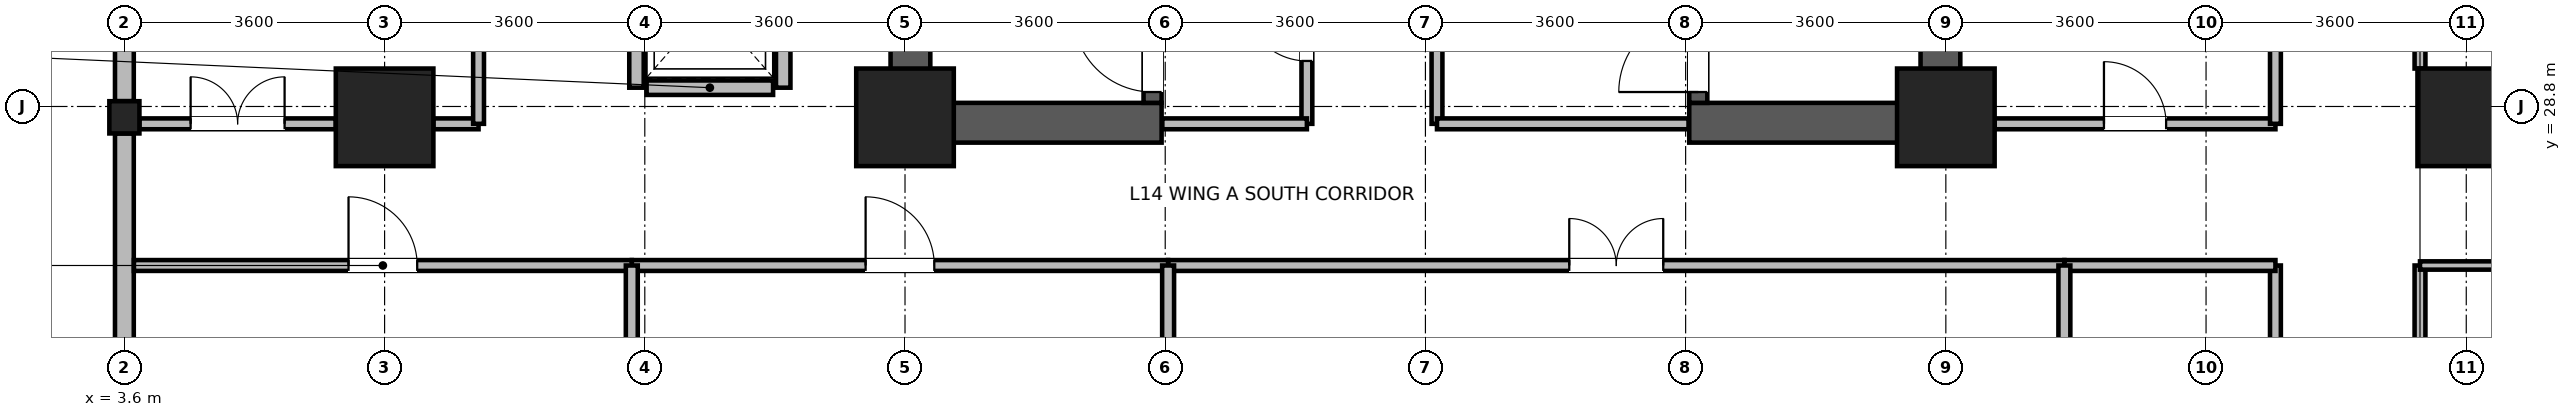
"""IFC4 building model, lengths in metres.
Left out: names, types, materials, properties, quantities, classifications, styles, units other than length and angle.
Written with IfcOpenShell. Run it as: python <this file> out.ifc"""

import sys

from ifc_helpers import new_model, si_unit, direction, frame, frame_2d, origin, origin_2d, place, context, subcontext, project, spatial, rectangle, i_section, extrude, source, transform, mapped, element, fill, save


model = new_model("IFC4")
c1 = context("Model", 3, precision=1e-05, world=origin(), true_north=direction((0.0, 1.0)))
c2 = subcontext(c1, "Body", "Model", "MODEL_VIEW")
j1 = project(units=[si_unit("LENGTHUNIT", "METRE"), si_unit("PLANEANGLEUNIT", "RADIAN")], contexts=[c1])
p1 = place(None, origin())
s1 = spatial("IfcSite", under=j1, at=p1, CompositionType="ELEMENT")
p2 = place(p1, origin())
s2 = spatial("IfcBuilding", under=s1, at=p2, CompositionType="ELEMENT")
p3 = place(p2, frame((0.0, 0.0, 58.6)))
s3 = spatial("IfcBuildingStorey", under=s2, at=p3, CompositionType="ELEMENT", Elevation=58.6)
for number, where, z_axis, x_axis in (
    (1, (14.475, 28.3, 0.0), (0.0, 0.0, 1.0), (0.0, 1.0, 0.0)),
    (2, (28.725, 28.3, 0.0), (0.0, 0.0, 1.0), (0.0, 1.0, 0.0)),
):
    element("IfcWall", number, at=place(p3, frame(where, z_axis=z_axis, x_axis=x_axis)), inside=s3, PredefinedType="SHEAR", context=c2, shape_type="SweptSolid", body=[
        extrude(rectangle(XDim=8.1, YDim=0.55, at=frame_2d((4.05, 0.0))), origin(), (0.0, 0.0, 1.0), 3.45),
    ])
for number, where, z_axis, x_axis in (
    (3, (14.75, 28.575, 0.0), (0.0, 0.0, 1.0), (1.0, 0.0, 0.0)),
    (4, (25.25, 28.575, 0.0), (0.0, 0.0, 1.0), (1.0, 0.0, 0.0)),
):
    element("IfcWall", number, at=place(p3, frame(where, z_axis=z_axis, x_axis=x_axis)), inside=s3, PredefinedType="SHEAR", context=c2, shape_type="SweptSolid", body=[
        extrude(rectangle(XDim=3.2, YDim=0.55, at=frame_2d((1.6, 0.0))), origin(), (0.0, 0.0, 1.0), 3.45),
    ])
p4 = place(p3, frame((17.825, 28.85, 0.0), z_axis=(0.0, 0.0, 1.0), x_axis=(0.0, 1.0, 0.0)))
e5 = element("IfcWall", 5, at=p4, inside=s3, PredefinedType="SHEAR", context=c2, shape_type="SweptSolid", body=[
    extrude(rectangle(XDim=7.0, YDim=0.25, at=frame_2d((3.5, 0.0))), origin(), (0.0, 0.0, 1.0), 3.45),
])
p5 = place(p4, frame((0.15, 0.0, 0.0)))
e6 = element("IfcOpeningElement", 6, at=p5, cuts=e5, PredefinedType="OPENING", context=c2, shape_type="SweptSolid", body=[
    extrude(rectangle(XDim=1.1, YDim=2.08, at=frame_2d((0.55, 1.04))), frame((0.0, 0.135, 0.0), z_axis=(0.0, -1.0, 0.0), x_axis=(1.0, 0.0, 0.0)), (0.0, 0.0, 1.0), 0.27),
])
p6 = place(p3, frame((25.375, 28.85, 0.0), z_axis=(0.0, 0.0, 1.0), x_axis=(0.0, 1.0, 0.0)))
e7 = element("IfcWall", 7, at=p6, inside=s3, PredefinedType="SHEAR", context=c2, shape_type="SweptSolid", body=[
    extrude(rectangle(XDim=7.0, YDim=0.25, at=frame_2d((3.5, 0.0))), origin(), (0.0, 0.0, 1.0), 3.45),
])
p7 = place(p6, frame((0.15, 0.0, 0.0)))
e8 = element("IfcOpeningElement", 8, at=p7, cuts=e7, PredefinedType="OPENING", context=c2, shape_type="SweptSolid", body=[
    extrude(rectangle(XDim=1.1, YDim=2.08, at=frame_2d((0.55, 1.04))), frame((0.0, 0.135, 0.0), z_axis=(0.0, -1.0, 0.0), x_axis=(1.0, 0.0, 0.0)), (0.0, 0.0, 1.0), 0.27),
])
m1 = source(origin(), c2, "Body", "SweptSolid", [
    extrude(rectangle(XDim=1.35, YDim=1.35, at=origin_2d()), origin(), (0.0, 0.0, 1.0), 3.7),
])
for number, where, z_axis, x_axis in (
    (9, (7.2, 28.65, 0.0), (0.0, 0.0, 1.0), (1.0, 0.0, 0.0)),
    (10, (14.4, 28.65, 0.0), (0.0, 0.0, 1.0), (1.0, 0.0, 0.0)),
    (11, (28.8, 28.65, 0.0), (0.0, 0.0, 1.0), (1.0, 0.0, 0.0)),
    (12, (36.0, 28.65, 0.0), (0.0, 0.0, 1.0), (1.0, 0.0, 0.0)),
):
    element("IfcColumn", number, at=place(p3, frame(where, z_axis=z_axis, x_axis=x_axis)), inside=s3, PredefinedType="COLUMN", context=c2, shape_type="MappedRepresentation", body=[
        mapped(m1, transform((0.0, 0.0, 0.0), x_axis=(1.0, 0.0, 0.0), y_axis=(0.0, 1.0, 0.0), z_axis=(0.0, 0.0, 1.0), scale=1.0)),
    ])
m2 = source(origin(), c2, "Body", "SweptSolid", [
    extrude(i_section(OverallWidth=0.416, OverallDepth=0.446, WebThickness=0.029, FlangeThickness=0.04, FilletRadius=0.015, at=origin_2d()), origin(), (0.0, 0.0, 1.0), 3.7),
])
p8 = place(p3, frame((3.6, 28.65, 0.0), z_axis=(0.0, 0.0, 1.0), x_axis=(1.0, 0.0, 0.0)))
e13 = element("IfcColumn", 13, at=p8, inside=s3, PredefinedType="COLUMN", context=c2, shape_type="MappedRepresentation", body=[
    mapped(m2, transform((0.0, 0.0, 0.0), x_axis=(1.0, 0.0, 0.0), y_axis=(0.0, 1.0, 0.0), z_axis=(0.0, 0.0, 1.0), scale=1.0)),
])
p9 = place(p3, frame((3.6, 28.874, 0.0), z_axis=(0.0, 0.0, 1.0), x_axis=(0.0, 1.0, 0.0)))
e14 = element("IfcWall", 14, at=p9, inside=s3, PredefinedType="STANDARD", context=c2, shape_type="SweptSolid", body=[
    extrude(rectangle(XDim=7.052, YDim=0.26, at=frame_2d((3.526, 0.0))), origin(), (0.0, 0.0, 1.0), 2.93),
])
p10 = place(p9, frame((1.013, 0.0, 0.85)))
e15 = element("IfcOpeningElement", 15, at=p10, cuts=e14, PredefinedType="OPENING", context=c2, shape_type="SweptSolid", body=[
    extrude(rectangle(XDim=1.5, YDim=1.85, at=frame_2d((0.75, 0.925))), frame((0.0, 0.14, 0.0), z_axis=(0.0, -1.0, 0.0), x_axis=(1.0, 0.0, 0.0)), (0.0, 0.0, 1.0), 0.28),
])
p11 = place(p9, frame((4.539, 0.0, 0.85)))
e16 = element("IfcOpeningElement", 16, at=p11, cuts=e14, PredefinedType="OPENING", context=c2, shape_type="SweptSolid", body=[
    extrude(rectangle(XDim=1.5, YDim=1.85, at=frame_2d((0.75, 0.925))), frame((0.0, 0.14, 0.0), z_axis=(0.0, -1.0, 0.0), x_axis=(1.0, 0.0, 0.0)), (0.0, 0.0, 1.0), 0.28),
])
p12 = place(p3, frame((3.6, 21.47, 0.0), z_axis=(0.0, 0.0, 1.0), x_axis=(0.0, 1.0, 0.0)))
e17 = element("IfcWall", 17, at=p12, inside=s3, PredefinedType="STANDARD", context=c2, shape_type="SweptSolid", body=[
    extrude(rectangle(XDim=6.956, YDim=0.26, at=frame_2d((3.478, 0.0))), origin(), (0.0, 0.0, 1.0), 3.43),
])
p13 = place(p12, frame((0.989, 0.0, 0.85)))
e18 = element("IfcOpeningElement", 18, at=p13, cuts=e17, PredefinedType="OPENING", context=c2, shape_type="SweptSolid", body=[
    extrude(rectangle(XDim=1.5, YDim=1.85, at=frame_2d((0.75, 0.925))), frame((0.0, 0.14, 0.0), z_axis=(0.0, -1.0, 0.0), x_axis=(1.0, 0.0, 0.0)), (0.0, 0.0, 1.0), 0.28),
])
p14 = place(p12, frame((3.003, 0.0, 0.85)))
e19 = element("IfcOpeningElement", 19, at=p14, cuts=e17, PredefinedType="OPENING", context=c2, shape_type="SweptSolid", body=[
    extrude(rectangle(XDim=0.95, YDim=1.75, at=frame_2d((0.475, 0.875))), frame((0.0, 0.14, 0.0), z_axis=(0.0, -1.0, 0.0), x_axis=(1.0, 0.0, 0.0)), (0.0, 0.0, 1.0), 0.28),
])
p15 = place(p3, frame((10.825, 29.06, 0.0), z_axis=(0.0, 0.0, 1.0), x_axis=(1.0, 0.0, 0.0)))
e20 = element("IfcWall", 20, at=p15, inside=s3, PredefinedType="PARTITIONING", context=c2, shape_type="SweptSolid", body=[
    extrude(rectangle(XDim=1.75, YDim=0.2, at=frame_2d((0.875, 0.0))), origin(), (0.0, 0.0, 1.0), 3.43),
])
for number, where, z_axis, x_axis in (
    (21, (10.685, 29.06, 0.0), (0.0, 0.0, 1.0), (0.0, 1.0, 0.0)),
    (22, (12.715, 29.06, 0.0), (0.0, 0.0, 1.0), (0.0, 1.0, 0.0)),
):
    element("IfcWall", number, at=place(p3, frame(where, z_axis=z_axis, x_axis=x_axis)), inside=s3, PredefinedType="PARTITIONING", context=c2, shape_type="SweptSolid", body=[
        extrude(rectangle(XDim=2.28, YDim=0.2, at=frame_2d((1.14, 0.0))), origin(), (0.0, 0.0, 1.0), 3.43),
    ])
p16 = place(p3, frame((18.04, 26.6, 0.0), z_axis=(0.0, 0.0, 1.0), x_axis=(1.0, 0.0, 0.0)))
e23 = element("IfcWall", 23, at=p16, inside=s3, PredefinedType="PARTITIONING", context=c2, shape_type="SweptSolid", body=[
    extrude(rectangle(XDim=12.4, YDim=0.15, at=frame_2d((6.2, 0.0))), origin(), (0.0, 0.0, 1.0), 3.43),
])
p17 = place(p16, frame((5.55, 0.0, 0.0)))
e24 = element("IfcOpeningElement", 24, at=p17, cuts=e23, PredefinedType="OPENING", context=c2, shape_type="SweptSolid", body=[
    extrude(rectangle(XDim=1.3, YDim=2.12, at=frame_2d((0.65, 1.06))), frame((0.0, 0.085, 0.0), z_axis=(0.0, -1.0, 0.0), x_axis=(1.0, 0.0, 0.0)), (0.0, 0.0, 1.0), 0.17),
])
p18 = place(p3, frame((35.36, 22.275, 0.0), z_axis=(0.0, 0.0, 1.0), x_axis=(0.0, 1.0, 0.0)))
e25 = element("IfcWall", 25, at=p18, inside=s3, PredefinedType="PARTITIONING", context=c2, shape_type="SweptSolid", body=[
    extrude(rectangle(XDim=4.325, YDim=0.15, at=frame_2d((2.163, 0.0))), origin(), (0.0, 0.0, 1.0), 3.43),
])
p19 = place(p3, frame((35.36, 29.325, 0.0), z_axis=(0.0, 0.0, 1.0), x_axis=(0.0, 1.0, 0.0)))
e26 = element("IfcWall", 26, at=p19, inside=s3, PredefinedType="PARTITIONING", context=c2, shape_type="SweptSolid", body=[
    extrude(rectangle(XDim=6.15, YDim=0.15, at=frame_2d((3.075, 0.0))), origin(), (0.0, 0.0, 1.0), 3.43),
])
p20 = place(p19, frame((2.425, 0.0, 0.0)))
e27 = element("IfcOpeningElement", 27, at=p20, cuts=e26, PredefinedType="OPENING", context=c2, shape_type="SweptSolid", body=[
    extrude(rectangle(XDim=1.3, YDim=2.12, at=frame_2d((0.65, 1.06))), frame((0.0, 0.085, 0.0), z_axis=(0.0, -1.0, 0.0), x_axis=(1.0, 0.0, 0.0)), (0.0, 0.0, 1.0), 0.17),
])
p21 = place(p3, frame((10.62, 26.6, 0.0), z_axis=(0.0, 0.0, 1.0), x_axis=(1.0, 0.0, 0.0)))
e28 = element("IfcWall", 28, at=p21, inside=s3, PredefinedType="PARTITIONING", context=c2, shape_type="SweptSolid", body=[
    extrude(rectangle(XDim=7.42, YDim=0.15, at=frame_2d((3.71, 0.0))), origin(), (0.0, 0.0, 1.0), 3.43),
])
p22 = place(p21, frame((3.235, 0.0, 0.0)))
e29 = element("IfcOpeningElement", 29, at=p22, cuts=e28, PredefinedType="OPENING", context=c2, shape_type="SweptSolid", body=[
    extrude(rectangle(XDim=0.95, YDim=2.1, at=frame_2d((0.475, 1.05))), frame((0.0, 0.085, 0.0), z_axis=(0.0, -1.0, 0.0), x_axis=(1.0, 0.0, 0.0)), (0.0, 0.0, 1.0), 0.17),
])
p23 = place(p3, frame((3.732, 26.6, 0.0), z_axis=(0.0, 0.0, 1.0), x_axis=(1.0, 0.0, 0.0)))
e30 = element("IfcWall", 30, at=p23, inside=s3, PredefinedType="PARTITIONING", context=c2, shape_type="SweptSolid", body=[
    extrude(rectangle(XDim=6.888, YDim=0.15, at=frame_2d((3.444, 0.0))), origin(), (0.0, 0.0, 1.0), 3.43),
])
p24 = place(p23, frame((2.969, 0.0, 0.0)))
e31 = element("IfcOpeningElement", 31, at=p24, cuts=e30, PredefinedType="OPENING", context=c2, shape_type="SweptSolid", body=[
    extrude(rectangle(XDim=0.95, YDim=2.1, at=frame_2d((0.475, 1.05))), frame((0.0, 0.085, 0.0), z_axis=(0.0, -1.0, 0.0), x_axis=(1.0, 0.0, 0.0)), (0.0, 0.0, 1.0), 0.17),
])
p25 = place(p3, frame((33.36, 21.6, 0.0), z_axis=(0.0, 0.0, 1.0), x_axis=(0.0, 1.0, 0.0)))
e32 = element("IfcWall", 32, at=p25, inside=s3, PredefinedType="PARTITIONING", context=c2, shape_type="SweptSolid", body=[
    extrude(rectangle(XDim=5.0, YDim=0.15, at=frame_2d((2.5, 0.0))), origin(), (0.0, 0.0, 1.0), 3.43),
])
p26 = place(p25, frame((2.07, 0.0, 0.0)))
e33 = element("IfcOpeningElement", 33, at=p26, cuts=e32, PredefinedType="OPENING", context=c2, shape_type="SweptSolid", body=[
    extrude(rectangle(XDim=0.86, YDim=2.02, at=frame_2d((0.43, 1.01))), frame((0.0, 0.085, 0.0), z_axis=(0.0, -1.0, 0.0), x_axis=(1.0, 0.0, 0.0)), (0.0, 0.0, 1.0), 0.17),
])
p27 = place(p3, frame((3.808, 28.56, 0.0), z_axis=(0.0, 0.0, 1.0), x_axis=(1.0, 0.0, 0.0)))
e34 = element("IfcWall", 34, at=p27, inside=s3, PredefinedType="PARTITIONING", context=c2, shape_type="SweptSolid", body=[
    extrude(rectangle(XDim=2.717, YDim=0.15, at=frame_2d((1.358, 0.0))), origin(), (0.0, 0.0, 1.0), 2.78),
])
p28 = place(p27, frame((0.708, 0.0, 0.0)))
e35 = element("IfcOpeningElement", 35, at=p28, cuts=e34, PredefinedType="OPENING", context=c2, shape_type="SweptSolid", body=[
    extrude(rectangle(XDim=1.3, YDim=2.12, at=frame_2d((0.65, 1.06))), frame((0.0, 0.085, 0.0), z_axis=(0.0, -1.0, 0.0), x_axis=(1.0, 0.0, 0.0)), (0.0, 0.0, 1.0), 0.17),
])
p29 = place(p3, frame((7.875, 28.56, 0.0), z_axis=(0.0, 0.0, 1.0), x_axis=(1.0, 0.0, 0.0)))
e36 = element("IfcWall", 36, at=p29, inside=s3, PredefinedType="PARTITIONING", context=c2, shape_type="SweptSolid", body=[
    extrude(rectangle(XDim=0.625, YDim=0.15, at=frame_2d((0.312, 0.0))), origin(), (0.0, 0.0, 1.0), 2.78),
])
p30 = place(p3, frame((29.475, 28.56, 0.0), z_axis=(0.0, 0.0, 1.0), x_axis=(1.0, 0.0, 0.0)))
e37 = element("IfcWall", 37, at=p30, inside=s3, PredefinedType="PARTITIONING", context=c2, shape_type="SweptSolid", body=[
    extrude(rectangle(XDim=3.885, YDim=0.15, at=frame_2d((1.942, 0.0))), origin(), (0.0, 0.0, 1.0), 2.78),
])
p31 = place(p30, frame((1.512, 0.0, 0.0)))
e38 = element("IfcOpeningElement", 38, at=p31, cuts=e37, PredefinedType="OPENING", context=c2, shape_type="SweptSolid", body=[
    extrude(rectangle(XDim=0.86, YDim=2.02, at=frame_2d((0.43, 1.01))), frame((0.0, 0.085, 0.0), z_axis=(0.0, -1.0, 0.0), x_axis=(1.0, 0.0, 0.0)), (0.0, 0.0, 1.0), 0.17),
])
for number, where, z_axis, x_axis in (
    (39, (8.5, 28.56, 0.0), (0.0, 0.0, 1.0), (0.0, 1.0, 0.0)),
    (40, (33.36, 28.56, 0.0), (0.0, 0.0, 1.0), (0.0, 1.0, 0.0)),
):
    element("IfcWall", number, at=place(p3, frame(where, z_axis=z_axis, x_axis=x_axis)), inside=s3, PredefinedType="PARTITIONING", context=c2, shape_type="SweptSolid", body=[
        extrude(rectangle(XDim=3.84, YDim=0.15, at=frame_2d((1.92, 0.0))), origin(), (0.0, 0.0, 1.0), 3.43),
    ])
p32 = place(p3, frame((30.44, 26.6, 0.0), z_axis=(0.0, 0.0, 1.0), x_axis=(1.0, 0.0, 0.0)))
e41 = element("IfcWall", 41, at=p32, inside=s3, PredefinedType="PARTITIONING", context=c2, shape_type="SweptSolid", body=[
    extrude(rectangle(XDim=2.92, YDim=0.15, at=frame_2d((1.46, 0.0))), origin(), (0.0, 0.0, 1.0), 3.43),
])
p33 = place(p3, frame((19.96, 28.56, 0.0), z_axis=(0.0, 0.0, 1.0), x_axis=(0.0, 1.0, 0.0)))
e42 = element("IfcWall", 42, at=p33, inside=s3, PredefinedType="PARTITIONING", context=c2, shape_type="SweptSolid", body=[
    extrude(rectangle(XDim=2.6, YDim=0.15, at=frame_2d((1.3, 0.0))), origin(), (0.0, 0.0, 1.0), 3.43),
])
p34 = place(p33, frame((0.87, 0.0, 0.0)))
e43 = element("IfcOpeningElement", 43, at=p34, cuts=e42, PredefinedType="OPENING", context=c2, shape_type="SweptSolid", body=[
    extrude(rectangle(XDim=0.86, YDim=2.02, at=frame_2d((0.43, 1.01))), frame((0.0, 0.085, 0.0), z_axis=(0.0, -1.0, 0.0), x_axis=(1.0, 0.0, 0.0)), (0.0, 0.0, 1.0), 0.17),
])
p35 = place(p3, frame((17.96, 28.56, 0.0), z_axis=(0.0, 0.0, 1.0), x_axis=(1.0, 0.0, 0.0)))
e44 = element("IfcWall", 44, at=p35, inside=s3, PredefinedType="PARTITIONING", context=c2, shape_type="SweptSolid", body=[
    extrude(rectangle(XDim=2.0, YDim=0.15, at=frame_2d((1.0, 0.0))), origin(), (0.0, 0.0, 1.0), 2.23),
])
p36 = place(p3, frame((35.36, 26.6, 0.0), z_axis=(0.0, 0.0, 1.0), x_axis=(1.0, 0.0, 0.0)))
e45 = element("IfcWall", 45, at=p36, inside=s3, PredefinedType="PARTITIONING", context=c2, shape_type="SweptSolid", body=[
    extrude(rectangle(XDim=7.42, YDim=0.115, at=frame_2d((3.71, 0.0))), origin(), (0.0, 0.0, 1.0), 3.43),
])
p37 = place(p3, frame((18.04, 21.732, 0.0), z_axis=(0.0, 0.0, 1.0), x_axis=(0.0, 1.0, 0.0)))
e46 = element("IfcWall", 46, at=p37, inside=s3, PredefinedType="PARTITIONING", context=c2, shape_type="SweptSolid", body=[
    extrude(rectangle(XDim=4.868, YDim=0.165, at=frame_2d((2.434, 0.0))), origin(), (0.0, 0.0, 1.0), 3.07),
])
p38 = place(p3, frame((30.44, 21.6, 0.0), z_axis=(0.0, 0.0, 1.0), x_axis=(0.0, 1.0, 0.0)))
e47 = element("IfcWall", 47, at=p38, inside=s3, PredefinedType="PARTITIONING", context=c2, shape_type="SweptSolid", body=[
    extrude(rectangle(XDim=5.0, YDim=0.165, at=frame_2d((2.5, 0.0))), origin(), (0.0, 0.0, 1.0), 3.43),
])
p39 = place(p3, frame((21.76, 28.56, 0.0), z_axis=(0.0, 0.0, 1.0), x_axis=(0.0, 1.0, 0.0)))
e48 = element("IfcWall", 48, at=p39, inside=s3, PredefinedType="PARTITIONING", context=c2, shape_type="SweptSolid", body=[
    extrude(rectangle(XDim=4.6, YDim=0.15, at=frame_2d((2.3, 0.0))), origin(), (0.0, 0.0, 1.0), 3.43),
])
p40 = place(p39, frame((1.55, 0.0, 0.0)))
e49 = element("IfcOpeningElement", 49, at=p40, cuts=e48, PredefinedType="OPENING", context=c2, shape_type="SweptSolid", body=[
    extrude(rectangle(XDim=1.5, YDim=2.1, at=frame_2d((0.75, 1.05))), frame((0.0, 0.085, 0.0), z_axis=(0.0, -1.0, 0.0), x_axis=(1.0, 0.0, 0.0)), (0.0, 0.0, 1.0), 0.17),
])
p41 = place(p3, frame((21.76, 28.56, 0.0), z_axis=(0.0, 0.0, 1.0), x_axis=(1.0, 0.0, 0.0)))
e50 = element("IfcWall", 50, at=p41, inside=s3, PredefinedType="PARTITIONING", context=c2, shape_type="SweptSolid", body=[
    extrude(rectangle(XDim=3.48, YDim=0.15, at=frame_2d((1.74, 0.0))), origin(), (0.0, 0.0, 1.0), 2.23),
])
p42 = place(p3, frame((10.62, 23.5, 0.0), z_axis=(0.0, 0.0, 1.0), x_axis=(0.0, 1.0, 0.0)))
e51 = element("IfcWall", 51, at=p42, inside=s3, PredefinedType="PARTITIONING", context=c2, shape_type="SweptSolid", body=[
    extrude(rectangle(XDim=3.1, YDim=0.165, at=frame_2d((1.55, 0.0))), origin(), (0.0, 0.0, 1.0), 3.43),
])
p43 = place(p5, origin())
e52 = element("IfcDoor", 52, at=p43, inside=s3, OperationType="SINGLE_SWING_RIGHT", PredefinedType="DOOR", context=c2, shape_type="SweptSolid", body=[
    extrude(rectangle(XDim=1.1, YDim=2.08, at=frame_2d((0.55, 1.04))), frame((0.0, 0.025, 0.0), z_axis=(0.0, -1.0, 0.0), x_axis=(1.0, 0.0, 0.0)), (0.0, 0.0, 1.0), 0.05),
])
fill(e6, e52)
p44 = place(p7, origin())
e53 = element("IfcDoor", 53, at=p44, inside=s3, OperationType="SINGLE_SWING_LEFT", PredefinedType="DOOR", context=c2, shape_type="SweptSolid", body=[
    extrude(rectangle(XDim=1.1, YDim=2.08, at=frame_2d((0.55, 1.04))), frame((0.0, 0.025, 0.0), z_axis=(0.0, -1.0, 0.0), x_axis=(1.0, 0.0, 0.0)), (0.0, 0.0, 1.0), 0.05),
])
fill(e8, e53)
p45 = place(p17, origin())
e54 = element("IfcDoor", 54, at=p45, inside=s3, OperationType="DOUBLE_DOOR_SINGLE_SWING", PredefinedType="DOOR", context=c2, shape_type="SweptSolid", body=[
    extrude(rectangle(XDim=1.3, YDim=2.12, at=frame_2d((0.65, 1.06))), frame((0.0, 0.025, 0.0), z_axis=(0.0, -1.0, 0.0), x_axis=(1.0, 0.0, 0.0)), (0.0, 0.0, 1.0), 0.05),
])
fill(e24, e54)
p46 = place(p22, origin())
e55 = element("IfcDoor", 55, at=p46, inside=s3, OperationType="SINGLE_SWING_LEFT", PredefinedType="DOOR", context=c2, shape_type="SweptSolid", body=[
    extrude(rectangle(XDim=0.95, YDim=2.1, at=frame_2d((0.475, 1.05))), frame((0.0, 0.025, 0.0), z_axis=(0.0, -1.0, 0.0), x_axis=(1.0, 0.0, 0.0)), (0.0, 0.0, 1.0), 0.05),
])
fill(e29, e55)
p47 = place(p24, origin())
e56 = element("IfcDoor", 56, at=p47, inside=s3, OperationType="SINGLE_SWING_LEFT", PredefinedType="DOOR", context=c2, shape_type="SweptSolid", body=[
    extrude(rectangle(XDim=0.95, YDim=2.1, at=frame_2d((0.475, 1.05))), frame((0.0, 0.025, 0.0), z_axis=(0.0, -1.0, 0.0), x_axis=(1.0, 0.0, 0.0)), (0.0, 0.0, 1.0), 0.05),
])
fill(e31, e56)
p48 = place(p28, origin())
e57 = element("IfcDoor", 57, at=p48, inside=s3, OperationType="DOUBLE_DOOR_SINGLE_SWING", PredefinedType="DOOR", context=c2, shape_type="SweptSolid", body=[
    extrude(rectangle(XDim=1.3, YDim=2.12, at=frame_2d((0.65, 1.06))), frame((0.0, 0.025, 0.0), z_axis=(0.0, -1.0, 0.0), x_axis=(1.0, 0.0, 0.0)), (0.0, 0.0, 1.0), 0.05),
])
fill(e35, e57)
p49 = place(p31, origin())
e58 = element("IfcDoor", 58, at=p49, inside=s3, OperationType="SINGLE_SWING_LEFT", PredefinedType="DOOR", context=c2, shape_type="SweptSolid", body=[
    extrude(rectangle(XDim=0.86, YDim=2.02, at=frame_2d((0.43, 1.01))), frame((0.0, 0.025, 0.0), z_axis=(0.0, -1.0, 0.0), x_axis=(1.0, 0.0, 0.0)), (0.0, 0.0, 1.0), 0.05),
])
fill(e38, e58)
p50 = place(p34, origin())
e59 = element("IfcDoor", 59, at=p50, inside=s3, OperationType="SINGLE_SWING_RIGHT", PredefinedType="DOOR", context=c2, shape_type="SweptSolid", body=[
    extrude(rectangle(XDim=0.86, YDim=2.02, at=frame_2d((0.43, 1.01))), frame((0.0, 0.025, 0.0), z_axis=(0.0, -1.0, 0.0), x_axis=(1.0, 0.0, 0.0)), (0.0, 0.0, 1.0), 0.05),
])
fill(e43, e59)
save(model, sys.argv[1])
